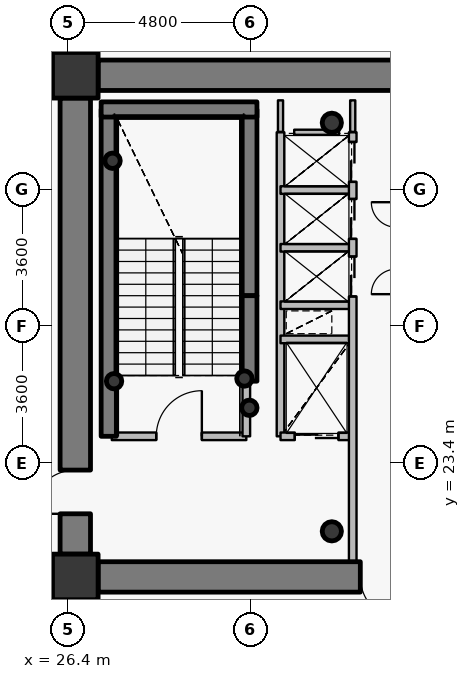
"""IFC4 building model, lengths in metres.
Left out: names, types, materials, properties, quantities, classifications, styles, units other than length and angle.
Written with IfcOpenShell. Run it as: python <this file> out.ifc"""

import sys

from ifc_helpers import new_model, si_unit, direction, frame, frame_2d, origin, origin_2d, place, context, subcontext, project, spatial, rectangle, hollow_circle, extrude, source, transform, mapped, element, fill, save


model = new_model("IFC4")
c1 = context("Model", 3, precision=1e-05, world=origin(), true_north=direction((0.0, 1.0)))
c2 = subcontext(c1, "Body", "Model", "MODEL_VIEW")
j1 = project(units=[si_unit("LENGTHUNIT", "METRE"), si_unit("PLANEANGLEUNIT", "RADIAN")], contexts=[c1])
p1 = place(None, origin())
s1 = spatial("IfcSite", under=j1, at=p1, CompositionType="ELEMENT")
p2 = place(p1, origin())
s2 = spatial("IfcBuilding", under=s1, at=p2, CompositionType="ELEMENT")
p3 = place(p2, frame((0.0, 0.0, 167.4)))
s3 = spatial("IfcBuildingStorey", under=s2, at=p3, CompositionType="ELEMENT", Elevation=167.4)
for number, where, z_axis, x_axis in (
    (1, (26.6, 20.4, 0.0), (0.0, 0.0, 1.0), (1.0, 0.0, 0.0)),
    (2, (26.6, 33.6, 0.0), (0.0, 0.0, 1.0), (1.0, 0.0, 0.0)),
):
    element("IfcColumn", number, at=place(p3, frame(where, z_axis=z_axis, x_axis=x_axis)), inside=s3, PredefinedType="COLUMN", context=c2, shape_type="SweptSolid", body=[
        extrude(rectangle(XDim=1.2, YDim=1.2, at=origin_2d()), origin(), (0.0, 0.0, 1.0), 3.75),
    ])
for number, where, z_axis, x_axis in (
    (3, (33.35, 21.6, 0.0), (0.0, 0.0, 1.0), (1.0, 0.0, 0.0)),
    (4, (33.35, 32.35, 0.0), (0.0, 0.0, 1.0), (1.0, 0.0, 0.0)),
):
    element("IfcColumn", number, at=place(p3, frame(where, z_axis=z_axis, x_axis=x_axis)), inside=s3, PredefinedType="COLUMN", context=c2, shape_type="SweptSolid", body=[
        extrude(hollow_circle(Radius=0.254, WallThickness=0.02, at=origin_2d()), origin(), (0.0, 0.0, 1.0), 3.75),
    ])
p4 = place(p3, frame((27.48, 24.1, 0.0), z_axis=(0.0, 0.0, 1.0), x_axis=(0.0, 1.0, 0.0)))
e5 = element("IfcWall", 5, at=p4, inside=s3, PredefinedType="SHEAR", context=c2, shape_type="SweptSolid", body=[
    extrude(rectangle(XDim=8.6, YDim=0.4, at=frame_2d((4.3, 0.0))), origin(), (0.0, 0.0, 1.0), 3.75),
])
p5 = place(p3, frame((31.18, 27.8, 0.0), z_axis=(0.0, 0.0, 1.0), x_axis=(0.0, 1.0, 0.0)))
e6 = element("IfcWall", 6, at=p5, inside=s3, PredefinedType="SHEAR", context=c2, shape_type="SweptSolid", body=[
    extrude(rectangle(XDim=4.9, YDim=0.4, at=frame_2d((2.45, 0.0))), origin(), (0.0, 0.0, 1.0), 3.75),
])
p6 = place(p3, frame((27.28, 32.7, 0.0), z_axis=(0.0, 0.0, 1.0), x_axis=(1.0, 0.0, 0.0)))
e7 = element("IfcWall", 7, at=p6, inside=s3, PredefinedType="SHEAR", context=c2, shape_type="SweptSolid", body=[
    extrude(rectangle(XDim=4.1, YDim=0.4, at=frame_2d((2.05, 0.0))), origin(), (0.0, 0.0, 1.0), 3.75),
])
for number, where, z_axis, x_axis in (
    (8, (27.58, 31.35, 0.0), (0.0, 0.0, 1.0), (1.0, 0.0, 0.0)),
    (9, (31.05, 25.62, 0.0), (0.0, 0.0, 1.0), (1.0, 0.0, 0.0)),
    (10, (31.18, 24.85, 0.0), (0.0, 0.0, 1.0), (1.0, 0.0, 0.0)),
    (11, (27.62, 25.55, 0.0), (0.0, 0.0, 1.0), (1.0, 0.0, 0.0)),
):
    element("IfcColumn", number, at=place(p3, frame(where, z_axis=z_axis, x_axis=x_axis)), inside=s3, PredefinedType="COLUMN", context=c2, shape_type="SweptSolid", body=[
        extrude(hollow_circle(Radius=0.203, WallThickness=0.016, at=origin_2d()), origin(), (0.0, 0.0, 1.0), 3.75),
    ])
p7 = place(p3, frame((27.2, 33.6, 0.0), z_axis=(0.0, 0.0, 1.0), x_axis=(1.0, 0.0, 0.0)))
e12 = element("IfcWall", 12, at=p7, inside=s3, PredefinedType="SHEAR", context=c2, shape_type="SweptSolid", body=[
    extrude(rectangle(XDim=17.6, YDim=0.8, at=frame_2d((8.8, 0.0))), origin(), (0.0, 0.0, 1.0), 2.95),
])
p8 = place(p7, frame((13.45, 0.0, 0.0)))
e13 = element("IfcOpeningElement", 13, at=p8, cuts=e12, PredefinedType="OPENING", context=c2, shape_type="SweptSolid", body=[
    extrude(rectangle(XDim=1.15, YDim=2.15, at=origin_2d()), frame((0.575, 0.41, 1.075), z_axis=(0.0, -1.0, 0.0), x_axis=(1.0, 0.0, 0.0)), (0.0, 0.0, 1.0), 0.82),
])
p9 = place(p3, frame((44.8, 20.4, 0.0), z_axis=(0.0, 0.0, 1.0), x_axis=(-1.0, 0.0, 0.0)))
e14 = element("IfcWall", 14, at=p9, inside=s3, PredefinedType="SHEAR", context=c2, shape_type="SweptSolid", body=[
    extrude(rectangle(XDim=17.6, YDim=0.8, at=frame_2d((8.8, 0.0))), origin(), (0.0, 0.0, 1.0), 2.95),
])
p10 = place(p9, frame((9.55, 0.0, 0.0)))
e15 = element("IfcOpeningElement", 15, at=p10, cuts=e14, PredefinedType="OPENING", context=c2, shape_type="SweptSolid", body=[
    extrude(rectangle(XDim=1.15, YDim=2.15, at=origin_2d()), frame((0.575, 0.41, 1.075), z_axis=(0.0, -1.0, 0.0), x_axis=(1.0, 0.0, 0.0)), (0.0, 0.0, 1.0), 0.82),
])
p11 = place(p3, frame((26.6, 21.0, 0.0), z_axis=(0.0, 0.0, 1.0), x_axis=(0.0, 1.0, 0.0)))
e16 = element("IfcWall", 16, at=p11, inside=s3, PredefinedType="SHEAR", context=c2, shape_type="SweptSolid", body=[
    extrude(rectangle(XDim=12.0, YDim=0.8, at=frame_2d((6.0, 0.0))), origin(), (0.0, 0.0, 1.0), 2.95),
])
p12 = place(p11, frame((1.061, 0.0, 0.0)))
e17 = element("IfcOpeningElement", 17, at=p12, cuts=e16, PredefinedType="OPENING", context=c2, shape_type="SweptSolid", body=[
    extrude(rectangle(XDim=1.15, YDim=2.15, at=origin_2d()), frame((0.575, 0.41, 1.075), z_axis=(0.0, -1.0, 0.0), x_axis=(1.0, 0.0, 0.0)), (0.0, 0.0, 1.0), 0.82),
])
p13 = place(p3, frame((31.18, 25.55, 0.0), z_axis=(0.0, 0.0, 1.0), x_axis=(0.0, 1.0, 0.0)))
e18 = element("IfcWall", 18, at=p13, inside=s3, PredefinedType="SHEAR", context=c2, shape_type="SweptSolid", body=[
    extrude(rectangle(XDim=2.25, YDim=0.4, at=frame_2d((1.125, 0.0))), origin(), (0.0, 0.0, 1.0), 3.1),
])
p14 = place(p3, frame((27.56, 24.1, 0.0), z_axis=(0.0, 0.0, 1.0), x_axis=(1.0, 0.0, 0.0)))
e19 = element("IfcWall", 19, at=p14, inside=s3, PredefinedType="PARTITIONING", context=c2, shape_type="SweptSolid", body=[
    extrude(rectangle(XDim=3.54, YDim=0.2, at=frame_2d((1.77, 0.0))), origin(), (0.0, 0.0, 1.0), 3.5),
])
p15 = place(p14, frame((1.17, 0.0, 0.0)))
e20 = element("IfcOpeningElement", 20, at=p15, cuts=e19, PredefinedType="OPENING", context=c2, shape_type="SweptSolid", body=[
    extrude(rectangle(XDim=1.2, YDim=2.15, at=origin_2d()), frame((0.6, 0.11, 1.075), z_axis=(0.0, -1.0, 0.0), x_axis=(1.0, 0.0, 0.0)), (0.0, 0.0, 1.0), 0.22),
])
p16 = place(p3, frame((31.1, 24.1, 0.0), z_axis=(0.0, 0.0, 1.0), x_axis=(0.0, 1.0, 0.0)))
e21 = element("IfcWall", 21, at=p16, inside=s3, PredefinedType="PARTITIONING", context=c2, shape_type="SweptSolid", body=[
    extrude(rectangle(XDim=1.44, YDim=0.2, at=frame_2d((0.72, 0.0))), origin(), (0.0, 0.0, 1.0), 3.5),
])
p17 = place(p3, frame((32.0, 24.1, 0.0), z_axis=(0.0, 0.0, 1.0), x_axis=(0.0, 1.0, 0.0)))
e22 = element("IfcWall", 22, at=p17, inside=s3, PredefinedType="PARTITIONING", context=c2, shape_type="SweptSolid", body=[
    extrude(rectangle(XDim=8.0, YDim=0.2, at=frame_2d((4.0, 0.0))), origin(), (0.0, 0.0, 1.0), 3.5),
])
p18 = place(p3, frame((32.0, 24.1, 0.0), z_axis=(0.0, 0.0, 1.0), x_axis=(1.0, 0.0, 0.0)))
e23 = element("IfcWall", 23, at=p18, inside=s3, PredefinedType="PARTITIONING", context=c2, shape_type="SweptSolid", body=[
    extrude(rectangle(XDim=1.9, YDim=0.2, at=frame_2d((0.95, 0.0))), origin(), (0.0, 0.0, 1.0), 3.085),
])
p19 = place(p18, frame((0.375, 0.0, 0.0)))
e24 = element("IfcOpeningElement", 24, at=p19, cuts=e23, PredefinedType="OPENING", context=c2, shape_type="SweptSolid", body=[
    extrude(rectangle(XDim=1.15, YDim=2.15, at=origin_2d()), frame((0.575, 0.11, 1.075), z_axis=(0.0, -1.0, 0.0), x_axis=(1.0, 0.0, 0.0)), (0.0, 0.0, 1.0), 0.22),
])
for number, where, z_axis, x_axis in (
    (25, (32.0, 26.65, 0.0), (0.0, 0.0, 1.0), (1.0, 0.0, 0.0)),
    (26, (32.0, 27.55, 0.0), (0.0, 0.0, 1.0), (1.0, 0.0, 0.0)),
    (27, (32.0, 29.06, 0.0), (0.0, 0.0, 1.0), (1.0, 0.0, 0.0)),
    (28, (32.0, 30.58, 0.0), (0.0, 0.0, 1.0), (1.0, 0.0, 0.0)),
):
    element("IfcWall", number, at=place(p3, frame(where, z_axis=z_axis, x_axis=x_axis)), inside=s3, PredefinedType="PARTITIONING", context=c2, shape_type="SweptSolid", body=[
        extrude(rectangle(XDim=1.9, YDim=0.2, at=frame_2d((0.95, 0.0))), origin(), (0.0, 0.0, 1.0), 3.085),
    ])
p20 = place(p3, frame((33.9, 20.8, 0.0), z_axis=(0.0, 0.0, 1.0), x_axis=(0.0, 1.0, 0.0)))
e29 = element("IfcWall", 29, at=p20, inside=s3, PredefinedType="PARTITIONING", context=c2, shape_type="SweptSolid", body=[
    extrude(rectangle(XDim=11.3, YDim=0.2, at=frame_2d((5.65, 0.0))), origin(), (0.0, 0.0, 1.0), 3.085),
])
p21 = place(p20, frame((6.98, 0.0, 0.0)))
e30 = element("IfcOpeningElement", 30, at=p21, cuts=e29, PredefinedType="OPENING", context=c2, shape_type="SweptSolid", body=[
    extrude(rectangle(XDim=1.05, YDim=2.15, at=origin_2d()), frame((0.525, 0.11, 1.075), z_axis=(0.0, -1.0, 0.0), x_axis=(1.0, 0.0, 0.0)), (0.0, 0.0, 1.0), 0.22),
])
p22 = place(p20, frame((8.495, 0.0, 0.0)))
e31 = element("IfcOpeningElement", 31, at=p22, cuts=e29, PredefinedType="OPENING", context=c2, shape_type="SweptSolid", body=[
    extrude(rectangle(XDim=1.05, YDim=2.15, at=origin_2d()), frame((0.525, 0.11, 1.075), z_axis=(0.0, -1.0, 0.0), x_axis=(1.0, 0.0, 0.0)), (0.0, 0.0, 1.0), 0.22),
])
p23 = place(p20, frame((9.995, 0.0, 0.0)))
e32 = element("IfcOpeningElement", 32, at=p23, cuts=e29, PredefinedType="OPENING", context=c2, shape_type="SweptSolid", body=[
    extrude(rectangle(XDim=1.05, YDim=2.15, at=origin_2d()), frame((0.525, 0.11, 1.075), z_axis=(0.0, -1.0, 0.0), x_axis=(1.0, 0.0, 0.0)), (0.0, 0.0, 1.0), 0.22),
])
p24 = place(p3, frame((32.36, 32.1, 0.0), z_axis=(0.0, 0.0, 1.0), x_axis=(1.0, 0.0, 0.0)))
e33 = element("IfcWall", 33, at=p24, inside=s3, PredefinedType="PARTITIONING", context=c2, shape_type="SweptSolid", body=[
    extrude(rectangle(XDim=1.18, YDim=0.135, at=frame_2d((0.59, 0.0))), origin(), (0.0, 0.0, 1.0), 3.085),
])
p25 = place(p3, frame((32.0, 32.94, 0.0), z_axis=(0.0, 0.0, 1.0), x_axis=(0.0, -1.0, 0.0)))
e34 = element("IfcWall", 34, at=p25, inside=s3, PredefinedType="PARTITIONING", context=c2, shape_type="SweptSolid", body=[
    extrude(rectangle(XDim=0.83, YDim=0.135, at=frame_2d((0.415, 0.0))), origin(), (0.0, 0.0, 1.0), 3.035),
])
p26 = place(p3, frame((33.9, 32.11, 0.0), z_axis=(0.0, 0.0, 1.0), x_axis=(0.0, 1.0, 0.0)))
e35 = element("IfcWall", 35, at=p26, inside=s3, PredefinedType="PARTITIONING", context=c2, shape_type="SweptSolid", body=[
    extrude(rectangle(XDim=0.83, YDim=0.135, at=frame_2d((0.415, 0.0))), origin(), (0.0, 0.0, 1.0), 3.085),
])
p27 = place(p3, frame((27.19, 34.0, 0.0), z_axis=(0.0, 0.0, 1.0), x_axis=(-1.0, 0.0, 0.0)))
e36 = element("IfcWall", 36, at=p27, inside=s3, PredefinedType="PARTITIONING", context=c2, shape_type="SweptSolid", body=[
    extrude(rectangle(XDim=0.99, YDim=0.135, at=frame_2d((0.495, 0.0))), origin(), (0.0, 0.0, 1.0), 2.935),
])
p28 = place(p3, frame((26.2, 33.692, 0.0), z_axis=(0.0, 0.0, 1.0), x_axis=(0.0, -1.0, 0.0)))
e37 = element("IfcWall", 37, at=p28, inside=s3, PredefinedType="PARTITIONING", context=c2, shape_type="SweptSolid", body=[
    extrude(rectangle(XDim=0.682, YDim=0.135, at=frame_2d((0.341, 0.0))), origin(), (0.0, 0.0, 1.0), 3.5),
])
p29 = place(p3, frame((26.2, 20.99, 0.0), z_axis=(0.0, 0.0, 1.0), x_axis=(0.0, -1.0, 0.0)))
e38 = element("IfcWall", 38, at=p29, inside=s3, PredefinedType="PARTITIONING", context=c2, shape_type="SweptSolid", body=[
    extrude(rectangle(XDim=0.99, YDim=0.135, at=frame_2d((0.495, 0.0))), origin(), (0.0, 0.0, 1.0), 3.5),
])
p30 = place(p3, frame((26.508, 20.0, 0.0), z_axis=(0.0, 0.0, 1.0), x_axis=(1.0, 0.0, 0.0)))
e39 = element("IfcWall", 39, at=p30, inside=s3, PredefinedType="PARTITIONING", context=c2, shape_type="SweptSolid", body=[
    extrude(rectangle(XDim=0.682, YDim=0.135, at=frame_2d((0.341, 0.0))), origin(), (0.0, 0.0, 1.0), 2.935),
])
m1 = source(origin(), c2, "Body", "SweptSolid", [
    extrude(rectangle(XDim=1.15, YDim=2.15, at=origin_2d()), frame((0.575, 0.025, 1.075), z_axis=(0.0, -1.0, 0.0), x_axis=(1.0, 0.0, 0.0)), (0.0, 0.0, 1.0), 0.05),
])
p31 = place(p12, origin())
e40 = element("IfcDoor", 40, at=p31, inside=s3, OperationType="SINGLE_SWING_LEFT", PredefinedType="DOOR", context=c2, shape_type="MappedRepresentation", body=[
    mapped(m1, transform((0.0, 0.0, 0.0), x_axis=(1.0, 0.0, 0.0), y_axis=(0.0, 1.0, 0.0), z_axis=(0.0, 0.0, 1.0), scale=1.0)),
])
fill(e17, e40)
p32 = place(p10, origin())
e41 = element("IfcDoor", 41, at=p32, inside=s3, OperationType="SINGLE_SWING_LEFT", PredefinedType="DOOR", context=c2, shape_type="MappedRepresentation", body=[
    mapped(m1, transform((0.0, 0.0, 0.0), x_axis=(1.0, 0.0, 0.0), y_axis=(0.0, 1.0, 0.0), z_axis=(0.0, 0.0, 1.0), scale=1.0)),
])
fill(e15, e41)
m2 = source(origin(), c2, "Body", "SweptSolid", [
    extrude(rectangle(XDim=1.2, YDim=2.15, at=origin_2d()), frame((0.6, 0.025, 1.075), z_axis=(0.0, -1.0, 0.0), x_axis=(1.0, 0.0, 0.0)), (0.0, 0.0, 1.0), 0.05),
])
p33 = place(p15, origin())
e42 = element("IfcDoor", 42, at=p33, inside=s3, OperationType="SINGLE_SWING_RIGHT", PredefinedType="DOOR", context=c2, shape_type="MappedRepresentation", body=[
    mapped(m2, transform((0.0, 0.0, 0.0), x_axis=(1.0, 0.0, 0.0), y_axis=(0.0, 1.0, 0.0), z_axis=(0.0, 0.0, 1.0), scale=1.0)),
])
fill(e20, e42)
m3 = source(origin(), c2, "Body", "SweptSolid", [
    extrude(rectangle(XDim=1.15, YDim=2.15, at=origin_2d()), frame((0.575, 0.025, 1.075), z_axis=(0.0, -1.0, 0.0), x_axis=(1.0, 0.0, 0.0)), (0.0, 0.0, 1.0), 0.05),
])
p34 = place(p19, origin())
e43 = element("IfcDoor", 43, at=p34, inside=s3, OperationType="DOUBLE_DOOR_SLIDING", PredefinedType="USERDEFINED", context=c2, shape_type="MappedRepresentation", body=[
    mapped(m3, transform((0.0, 0.0, 0.0), x_axis=(1.0, 0.0, 0.0), y_axis=(0.0, 1.0, 0.0), z_axis=(0.0, 0.0, 1.0), scale=1.0)),
])
fill(e24, e43)
m4 = source(origin(), c2, "Body", "SweptSolid", [
    extrude(rectangle(XDim=1.05, YDim=2.15, at=origin_2d()), frame((0.525, 0.025, 1.075), z_axis=(0.0, -1.0, 0.0), x_axis=(1.0, 0.0, 0.0)), (0.0, 0.0, 1.0), 0.05),
])
p35 = place(p21, origin())
e44 = element("IfcDoor", 44, at=p35, inside=s3, OperationType="DOUBLE_DOOR_SLIDING", PredefinedType="USERDEFINED", context=c2, shape_type="MappedRepresentation", body=[
    mapped(m4, transform((0.0, 0.0, 0.0), x_axis=(1.0, 0.0, 0.0), y_axis=(0.0, 1.0, 0.0), z_axis=(0.0, 0.0, 1.0), scale=1.0)),
])
fill(e30, e44)
p36 = place(p22, origin())
e45 = element("IfcDoor", 45, at=p36, inside=s3, OperationType="DOUBLE_DOOR_SLIDING", PredefinedType="USERDEFINED", context=c2, shape_type="MappedRepresentation", body=[
    mapped(m4, transform((0.0, 0.0, 0.0), x_axis=(1.0, 0.0, 0.0), y_axis=(0.0, 1.0, 0.0), z_axis=(0.0, 0.0, 1.0), scale=1.0)),
])
fill(e31, e45)
p37 = place(p23, origin())
e46 = element("IfcDoor", 46, at=p37, inside=s3, OperationType="DOUBLE_DOOR_SLIDING", PredefinedType="USERDEFINED", context=c2, shape_type="MappedRepresentation", body=[
    mapped(m4, transform((0.0, 0.0, 0.0), x_axis=(1.0, 0.0, 0.0), y_axis=(0.0, 1.0, 0.0), z_axis=(0.0, 0.0, 1.0), scale=1.0)),
])
fill(e32, e46)
save(model, sys.argv[1])
